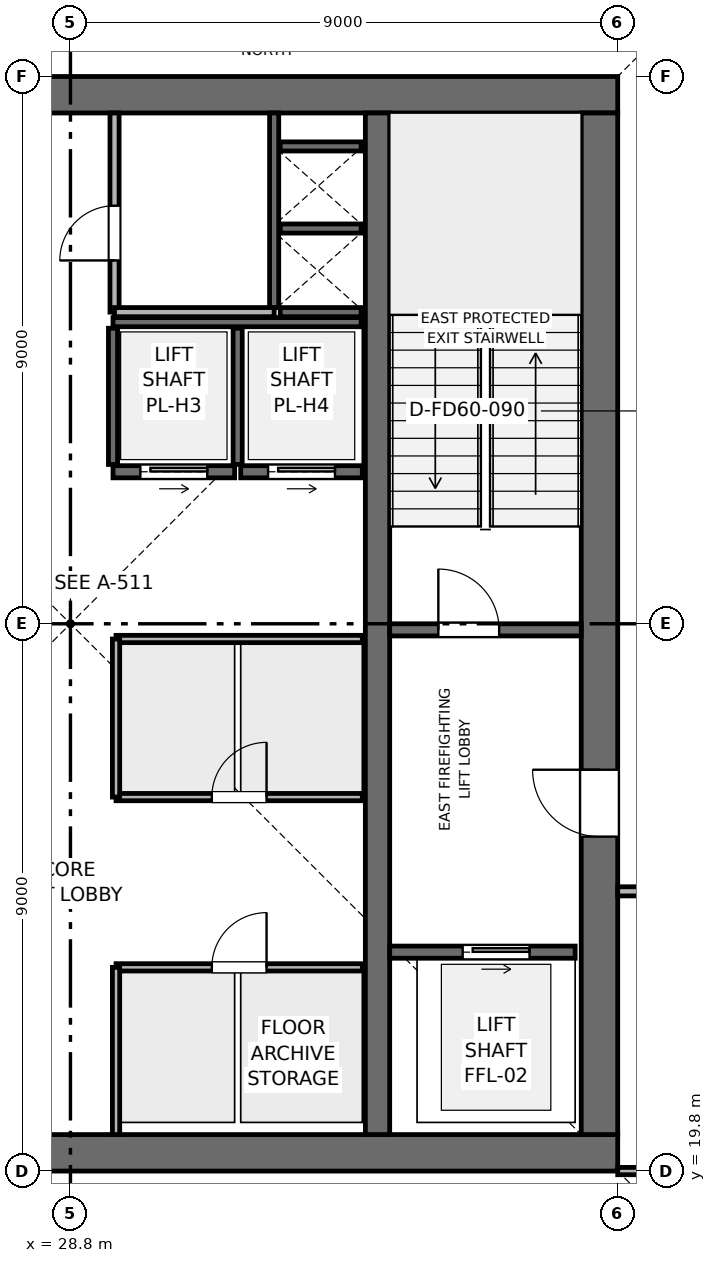
"""IFC4 building model, lengths in metres.
Left out: names, types, materials, properties, quantities, classifications, styles, units other than length and angle.
Written with IfcOpenShell. Run it as: python <this file> out.ifc"""

import sys

from ifc_helpers import new_model, si_unit, direction, frame, frame_2d, origin, place, context, subcontext, project, spatial, rectangle, extrude, element, fill, save


model = new_model("IFC4")
c1 = context("Model", 3, precision=1e-05, world=origin(), true_north=direction((0.0, 1.0)))
c2 = subcontext(c1, "Body", "Model", "MODEL_VIEW")
j1 = project(units=[si_unit("LENGTHUNIT", "METRE"), si_unit("PLANEANGLEUNIT", "RADIAN")], contexts=[c1])
p1 = place(None, origin())
s1 = spatial("IfcSite", under=j1, at=p1, CompositionType="ELEMENT")
p2 = place(p1, origin())
s2 = spatial("IfcBuilding", under=s1, at=p2, CompositionType="ELEMENT")
p3 = place(p2, frame((0.0, 0.0, 355.5)))
s3 = spatial("IfcBuildingStorey", under=s2, at=p3, CompositionType="ELEMENT", Elevation=355.5)
p4 = place(p3, frame((19.8, 20.1, 0.0), z_axis=(0.0, 0.0, 1.0), x_axis=(1.0, 0.0, 0.0)))
e1 = element("IfcWall", 1, at=p4, inside=s3, PredefinedType="SHEAR", context=c2, shape_type="SweptSolid", body=[
    extrude(rectangle(XDim=18.0, YDim=0.6, at=frame_2d((9.0, 0.0))), origin(), (0.0, 0.0, 1.0), 4.5),
])
p5 = place(p3, frame((19.8, 37.5, 0.0), z_axis=(0.0, 0.0, 1.0), x_axis=(1.0, 0.0, 0.0)))
e2 = element("IfcWall", 2, at=p5, inside=s3, PredefinedType="SHEAR", context=c2, shape_type="SweptSolid", body=[
    extrude(rectangle(XDim=18.0, YDim=0.6, at=frame_2d((9.0, 0.0))), origin(), (0.0, 0.0, 1.0), 4.5),
])
p6 = place(p5, frame((7.05, 0.0, 0.0)))
e3 = element("IfcOpeningElement", 3, at=p6, cuts=e2, PredefinedType="OPENING", context=c2, shape_type="SweptSolid", body=[
    extrude(rectangle(XDim=1.1, YDim=2.15, at=frame_2d((0.55, 1.075))), frame((0.0, 0.31, 0.0), z_axis=(0.0, -1.0, 0.0), x_axis=(1.0, 0.0, 0.0)), (0.0, 0.0, 1.0), 0.62),
])
p7 = place(p3, frame((37.5, 20.4, 0.0), z_axis=(0.0, 0.0, 1.0), x_axis=(0.0, 1.0, 0.0)))
e4 = element("IfcWall", 4, at=p7, inside=s3, PredefinedType="SHEAR", context=c2, shape_type="SweptSolid", body=[
    extrude(rectangle(XDim=16.8, YDim=0.6, at=frame_2d((8.4, 0.0))), origin(), (0.0, 0.0, 1.0), 4.5),
])
p8 = place(p7, frame((4.9, 0.0, 0.0)))
e5 = element("IfcOpeningElement", 5, at=p8, cuts=e4, PredefinedType="OPENING", context=c2, shape_type="SweptSolid", body=[
    extrude(rectangle(XDim=1.1, YDim=2.15, at=frame_2d((0.55, 1.075))), frame((0.0, 0.31, 0.0), z_axis=(0.0, -1.0, 0.0), x_axis=(1.0, 0.0, 0.0)), (0.0, 0.0, 1.0), 0.62),
])
p9 = place(p3, frame((33.85, 20.4, 0.0), z_axis=(0.0, 0.0, 1.0), x_axis=(0.0, 1.0, 0.0)))
e6 = element("IfcWall", 6, at=p9, inside=s3, PredefinedType="SHEAR", context=c2, shape_type="SweptSolid", body=[
    extrude(rectangle(XDim=16.8, YDim=0.4, at=frame_2d((8.4, 0.0))), origin(), (0.0, 0.0, 1.0), 4.5),
])
p10 = place(p3, frame((34.05, 28.7, 0.0), z_axis=(0.0, 0.0, 1.0), x_axis=(1.0, 0.0, 0.0)))
e7 = element("IfcWall", 7, at=p10, inside=s3, PredefinedType="SHEAR", context=c2, shape_type="SweptSolid", body=[
    extrude(rectangle(XDim=3.15, YDim=0.2, at=frame_2d((1.575, 0.0))), origin(), (0.0, 0.0, 1.0), 4.24),
])
p11 = place(p10, frame((0.8, 0.0, 0.0)))
e8 = element("IfcOpeningElement", 8, at=p11, cuts=e7, PredefinedType="OPENING", context=c2, shape_type="SweptSolid", body=[
    extrude(rectangle(XDim=1.0, YDim=2.1, at=frame_2d((0.5, 1.05))), frame((0.0, 0.11, 0.0), z_axis=(0.0, -1.0, 0.0), x_axis=(1.0, 0.0, 0.0)), (0.0, 0.0, 1.0), 0.22),
])
p12 = place(p3, frame((32.15, 34.0, 0.0), z_axis=(0.0, 0.0, 1.0), x_axis=(0.0, 1.0, 0.0)))
e9 = element("IfcWall", 9, at=p12, inside=s3, PredefinedType="SHEAR", context=c2, shape_type="SweptSolid", body=[
    extrude(rectangle(XDim=3.2, YDim=0.15, at=frame_2d((1.6, 0.0))), origin(), (0.0, 0.0, 1.0), 4.24),
])
for number, where, z_axis, x_axis in (
    (10, (32.25, 33.925, 0.0), (0.0, 0.0, 1.0), (1.0, 0.0, 0.0)),
    (11, (32.25, 35.3, 0.0), (0.0, 0.0, 1.0), (1.0, 0.0, 0.0)),
):
    element("IfcWall", number, at=place(p3, frame(where, z_axis=z_axis, x_axis=x_axis)), inside=s3, PredefinedType="SHEAR", context=c2, shape_type="SweptSolid", body=[
        extrude(rectangle(XDim=1.33, YDim=0.15, at=frame_2d((0.665, 0.0))), origin(), (0.0, 0.0, 1.0), 4.24),
    ])
p13 = place(p3, frame((34.05, 23.4, 0.0), z_axis=(0.0, 0.0, 1.0), x_axis=(1.0, 0.0, 0.0)))
e12 = element("IfcWall", 12, at=p13, inside=s3, PredefinedType="SHEAR", context=c2, shape_type="SweptSolid", body=[
    extrude(rectangle(XDim=3.05, YDim=0.2, at=frame_2d((1.525, 0.0))), origin(), (0.0, 0.0, 1.0), 4.24),
])
p14 = place(p13, frame((1.2, 0.0, 0.0)))
e13 = element("IfcOpeningElement", 13, at=p14, cuts=e12, PredefinedType="OPENING", context=c2, shape_type="SweptSolid", body=[
    extrude(rectangle(XDim=1.1, YDim=2.15, at=frame_2d((0.55, 1.075))), frame((0.0, 0.11, 0.0), z_axis=(0.0, -1.0, 0.0), x_axis=(1.0, 0.0, 0.0)), (0.0, 0.0, 1.0), 0.22),
])
p15 = place(p3, frame((29.5, 31.3, 0.0), z_axis=(0.0, 0.0, 1.0), x_axis=(1.0, 0.0, 0.0)))
e14 = element("IfcWall", 14, at=p15, inside=s3, PredefinedType="SHEAR", context=c2, shape_type="SweptSolid", body=[
    extrude(rectangle(XDim=2.0, YDim=0.2, at=frame_2d((1.0, 0.0))), origin(), (0.0, 0.0, 1.0), 4.24),
])
p16 = place(p15, frame((0.45, 0.0, 0.0)))
e15 = element("IfcOpeningElement", 15, at=p16, cuts=e14, PredefinedType="OPENING", context=c2, shape_type="SweptSolid", body=[
    extrude(rectangle(XDim=1.1, YDim=2.15, at=frame_2d((0.55, 1.075))), frame((0.0, 0.11, 0.0), z_axis=(0.0, -1.0, 0.0), x_axis=(1.0, 0.0, 0.0)), (0.0, 0.0, 1.0), 0.22),
])
p17 = place(p3, frame((31.6, 31.3, 0.0), z_axis=(0.0, 0.0, 1.0), x_axis=(1.0, 0.0, 0.0)))
e16 = element("IfcWall", 16, at=p17, inside=s3, PredefinedType="SHEAR", context=c2, shape_type="SweptSolid", body=[
    extrude(rectangle(XDim=2.0, YDim=0.2, at=frame_2d((1.0, 0.0))), origin(), (0.0, 0.0, 1.0), 4.24),
])
p18 = place(p17, frame((0.45, 0.0, 0.0)))
e17 = element("IfcOpeningElement", 17, at=p18, cuts=e16, PredefinedType="OPENING", context=c2, shape_type="SweptSolid", body=[
    extrude(rectangle(XDim=1.1, YDim=2.15, at=frame_2d((0.55, 1.075))), frame((0.0, 0.11, 0.0), z_axis=(0.0, -1.0, 0.0), x_axis=(1.0, 0.0, 0.0)), (0.0, 0.0, 1.0), 0.22),
])
p19 = place(p3, frame((32.25, 36.65, 0.0), z_axis=(0.0, 0.0, 1.0), x_axis=(1.0, 0.0, 0.0)))
e18 = element("IfcWall", 18, at=p19, inside=s3, PredefinedType="SHEAR", context=c2, shape_type="SweptSolid", body=[
    extrude(rectangle(XDim=1.33, YDim=0.15, at=frame_2d((0.665, 0.0))), origin(), (0.0, 0.0, 1.0), 4.24),
])
p20 = place(p3, frame((29.5, 33.76, 0.0), z_axis=(0.0, 0.0, 1.0), x_axis=(1.0, 0.0, 0.0)))
e19 = element("IfcWall", 19, at=p20, inside=s3, PredefinedType="SHEAR", context=c2, shape_type="SweptSolid", body=[
    extrude(rectangle(XDim=4.08, YDim=0.15, at=frame_2d((2.04, 0.0))), origin(), (0.0, 0.0, 1.0), 4.24),
])
for number, where, z_axis, x_axis in (
    (20, (29.5, 31.42, 0.0), (0.0, 0.0, 1.0), (0.0, 1.0, 0.0)),
    (21, (31.55, 31.42, 0.0), (0.0, 0.0, 1.0), (0.0, 1.0, 0.0)),
):
    element("IfcWall", number, at=place(p3, frame(where, z_axis=z_axis, x_axis=x_axis)), inside=s3, PredefinedType="SHEAR", context=c2, shape_type="SweptSolid", body=[
        extrude(rectangle(XDim=2.24, YDim=0.15, at=frame_2d((1.12, 0.0))), origin(), (0.0, 0.0, 1.0), 4.24),
    ])
p21 = place(p3, frame((29.525, 33.925, 0.0), z_axis=(0.0, 0.0, 1.0), x_axis=(0.0, 1.0, 0.0)))
e22 = element("IfcWall", 22, at=p21, inside=s3, PredefinedType="PARTITIONING", context=c2, shape_type="SweptSolid", body=[
    extrude(rectangle(XDim=3.275, YDim=0.15, at=frame_2d((1.637, 0.0))), origin(), (0.0, 0.0, 1.0), 4.24),
])
p22 = place(p21, frame((0.85, 0.0, 0.0)))
e23 = element("IfcOpeningElement", 23, at=p22, cuts=e22, PredefinedType="OPENING", context=c2, shape_type="SweptSolid", body=[
    extrude(rectangle(XDim=0.9, YDim=2.1, at=frame_2d((0.45, 1.05))), frame((0.0, 0.085, 0.0), z_axis=(0.0, -1.0, 0.0), x_axis=(1.0, 0.0, 0.0)), (0.0, 0.0, 1.0), 0.17),
])
p23 = place(p3, frame((29.525, 33.925, 0.0), z_axis=(0.0, 0.0, 1.0), x_axis=(1.0, 0.0, 0.0)))
e24 = element("IfcWall", 24, at=p23, inside=s3, PredefinedType="PARTITIONING", context=c2, shape_type="SweptSolid", body=[
    extrude(rectangle(XDim=2.625, YDim=0.15, at=frame_2d((1.312, 0.0))), origin(), (0.0, 0.0, 1.0), 4.24),
])
p24 = place(p3, frame((29.55, 23.15, 0.0), z_axis=(0.0, 0.0, 1.0), x_axis=(1.0, 0.0, 0.0)))
e25 = element("IfcWall", 25, at=p24, inside=s3, PredefinedType="PARTITIONING", context=c2, shape_type="SweptSolid", body=[
    extrude(rectangle(XDim=4.05, YDim=0.12, at=frame_2d((2.025, 0.0))), origin(), (0.0, 0.0, 1.0), 4.24),
])
p25 = place(p24, frame((1.575, 0.0, 0.0)))
e26 = element("IfcOpeningElement", 26, at=p25, cuts=e25, PredefinedType="OPENING", context=c2, shape_type="SweptSolid", body=[
    extrude(rectangle(XDim=0.9, YDim=2.1, at=frame_2d((0.45, 1.05))), frame((0.0, 0.07, 0.0), z_axis=(0.0, -1.0, 0.0), x_axis=(1.0, 0.0, 0.0)), (0.0, 0.0, 1.0), 0.14),
])
p26 = place(p3, frame((29.55, 20.4, 0.0), z_axis=(0.0, 0.0, 1.0), x_axis=(0.0, 1.0, 0.0)))
e27 = element("IfcWall", 27, at=p26, inside=s3, PredefinedType="PARTITIONING", context=c2, shape_type="SweptSolid", body=[
    extrude(rectangle(XDim=2.75, YDim=0.12, at=frame_2d((1.375, 0.0))), origin(), (0.0, 0.0, 1.0), 4.24),
])
p27 = place(p3, frame((29.55, 25.95, 0.0), z_axis=(0.0, 0.0, 1.0), x_axis=(1.0, 0.0, 0.0)))
e28 = element("IfcWall", 28, at=p27, inside=s3, PredefinedType="PARTITIONING", context=c2, shape_type="SweptSolid", body=[
    extrude(rectangle(XDim=4.05, YDim=0.12, at=frame_2d((2.025, 0.0))), origin(), (0.0, 0.0, 1.0), 4.24),
])
p28 = place(p27, frame((1.575, 0.0, 0.0)))
e29 = element("IfcOpeningElement", 29, at=p28, cuts=e28, PredefinedType="OPENING", context=c2, shape_type="SweptSolid", body=[
    extrude(rectangle(XDim=0.9, YDim=2.1, at=frame_2d((0.45, 1.05))), frame((0.0, 0.07, 0.0), z_axis=(0.0, -1.0, 0.0), x_axis=(1.0, 0.0, 0.0)), (0.0, 0.0, 1.0), 0.14),
])
p29 = place(p3, frame((29.55, 28.55, 0.0), z_axis=(0.0, 0.0, 1.0), x_axis=(1.0, 0.0, 0.0)))
e30 = element("IfcWall", 30, at=p29, inside=s3, PredefinedType="PARTITIONING", context=c2, shape_type="SweptSolid", body=[
    extrude(rectangle(XDim=4.05, YDim=0.12, at=frame_2d((2.025, 0.0))), origin(), (0.0, 0.0, 1.0), 4.24),
])
p30 = place(p3, frame((29.55, 25.95, 0.0), z_axis=(0.0, 0.0, 1.0), x_axis=(0.0, 1.0, 0.0)))
e31 = element("IfcWall", 31, at=p30, inside=s3, PredefinedType="PARTITIONING", context=c2, shape_type="SweptSolid", body=[
    extrude(rectangle(XDim=2.6, YDim=0.12, at=frame_2d((1.3, 0.0))), origin(), (0.0, 0.0, 1.0), 4.24),
])
p31 = place(p3, frame((37.8, 19.8, 0.0), z_axis=(0.0, 0.0, 1.0), x_axis=(1.0, 0.0, 0.0)))
e32 = element("IfcWall", 32, at=p31, inside=s3, PredefinedType="PARTITIONING", context=c2, shape_type="SweptSolid", body=[
    extrude(rectangle(XDim=11.27, YDim=0.12, at=frame_2d((5.635, 0.0))), origin(), (0.0, 0.0, 1.0), 3.825),
])
p32 = place(p3, frame((37.8, 24.4, 0.0), z_axis=(0.0, 0.0, 1.0), x_axis=(1.0, 0.0, 0.0)))
e33 = element("IfcWall", 33, at=p32, inside=s3, PredefinedType="PARTITIONING", context=c2, shape_type="SweptSolid", body=[
    extrude(rectangle(XDim=1.9, YDim=0.15, at=frame_2d((0.95, 0.0))), origin(), (0.0, 0.0, 1.0), 4.24),
])
p33 = place(p32, frame((0.45, 0.0, 0.0)))
e34 = element("IfcOpeningElement", 34, at=p33, cuts=e33, PredefinedType="OPENING", context=c2, shape_type="SweptSolid", body=[
    extrude(rectangle(XDim=0.9, YDim=2.1, at=frame_2d((0.45, 1.05))), frame((0.0, 0.085, 0.0), z_axis=(0.0, -1.0, 0.0), x_axis=(1.0, 0.0, 0.0)), (0.0, 0.0, 1.0), 0.17),
])
p34 = place(p11, origin())
e35 = element("IfcDoor", 35, at=p34, inside=s3, OperationType="SINGLE_SWING_LEFT", PredefinedType="DOOR", context=c2, shape_type="SweptSolid", body=[
    extrude(rectangle(XDim=1.0, YDim=2.1, at=frame_2d((0.5, 1.05))), frame((0.0, 0.025, 0.0), z_axis=(0.0, -1.0, 0.0), x_axis=(1.0, 0.0, 0.0)), (0.0, 0.0, 1.0), 0.05),
])
fill(e8, e35)
p35 = place(p14, origin())
e36 = element("IfcDoor", 36, at=p35, inside=s3, OperationType="SLIDING_TO_RIGHT", PredefinedType="DOOR", context=c2, shape_type="SweptSolid", body=[
    extrude(rectangle(XDim=1.1, YDim=2.15, at=frame_2d((0.55, 1.075))), frame((0.0, 0.025, 0.0), z_axis=(0.0, -1.0, 0.0), x_axis=(1.0, 0.0, 0.0)), (0.0, 0.0, 1.0), 0.05),
])
fill(e13, e36)
p36 = place(p16, origin())
e37 = element("IfcDoor", 37, at=p36, inside=s3, OperationType="SLIDING_TO_RIGHT", PredefinedType="DOOR", context=c2, shape_type="SweptSolid", body=[
    extrude(rectangle(XDim=1.1, YDim=2.15, at=frame_2d((0.55, 1.075))), frame((0.0, 0.025, 0.0), z_axis=(0.0, -1.0, 0.0), x_axis=(1.0, 0.0, 0.0)), (0.0, 0.0, 1.0), 0.05),
])
fill(e15, e37)
p37 = place(p18, origin())
e38 = element("IfcDoor", 38, at=p37, inside=s3, OperationType="SLIDING_TO_RIGHT", PredefinedType="DOOR", context=c2, shape_type="SweptSolid", body=[
    extrude(rectangle(XDim=1.1, YDim=2.15, at=frame_2d((0.55, 1.075))), frame((0.0, 0.025, 0.0), z_axis=(0.0, -1.0, 0.0), x_axis=(1.0, 0.0, 0.0)), (0.0, 0.0, 1.0), 0.05),
])
fill(e17, e38)
p38 = place(p22, origin())
e39 = element("IfcDoor", 39, at=p38, inside=s3, OperationType="SINGLE_SWING_LEFT", PredefinedType="DOOR", context=c2, shape_type="SweptSolid", body=[
    extrude(rectangle(XDim=0.9, YDim=2.1, at=frame_2d((0.45, 1.05))), frame((0.0, 0.025, 0.0), z_axis=(0.0, -1.0, 0.0), x_axis=(1.0, 0.0, 0.0)), (0.0, 0.0, 1.0), 0.05),
])
fill(e23, e39)
p39 = place(p25, origin())
e40 = element("IfcDoor", 40, at=p39, inside=s3, OperationType="SINGLE_SWING_RIGHT", PredefinedType="DOOR", context=c2, shape_type="SweptSolid", body=[
    extrude(rectangle(XDim=0.9, YDim=2.1, at=frame_2d((0.45, 1.05))), frame((0.0, 0.025, 0.0), z_axis=(0.0, -1.0, 0.0), x_axis=(1.0, 0.0, 0.0)), (0.0, 0.0, 1.0), 0.05),
])
fill(e26, e40)
p40 = place(p28, origin())
e41 = element("IfcDoor", 41, at=p40, inside=s3, OperationType="SINGLE_SWING_RIGHT", PredefinedType="DOOR", context=c2, shape_type="SweptSolid", body=[
    extrude(rectangle(XDim=0.9, YDim=2.1, at=frame_2d((0.45, 1.05))), frame((0.0, 0.025, 0.0), z_axis=(0.0, -1.0, 0.0), x_axis=(1.0, 0.0, 0.0)), (0.0, 0.0, 1.0), 0.05),
])
fill(e29, e41)
p41 = place(p8, origin())
e42 = element("IfcDoor", 42, at=p41, inside=s3, OperationType="SINGLE_SWING_RIGHT", PredefinedType="DOOR", context=c2, shape_type="SweptSolid", body=[
    extrude(rectangle(XDim=1.1, YDim=2.15, at=frame_2d((0.55, 1.075))), frame((0.0, 0.025, 0.0), z_axis=(0.0, -1.0, 0.0), x_axis=(1.0, 0.0, 0.0)), (0.0, 0.0, 1.0), 0.05),
])
fill(e5, e42)
save(model, sys.argv[1])
